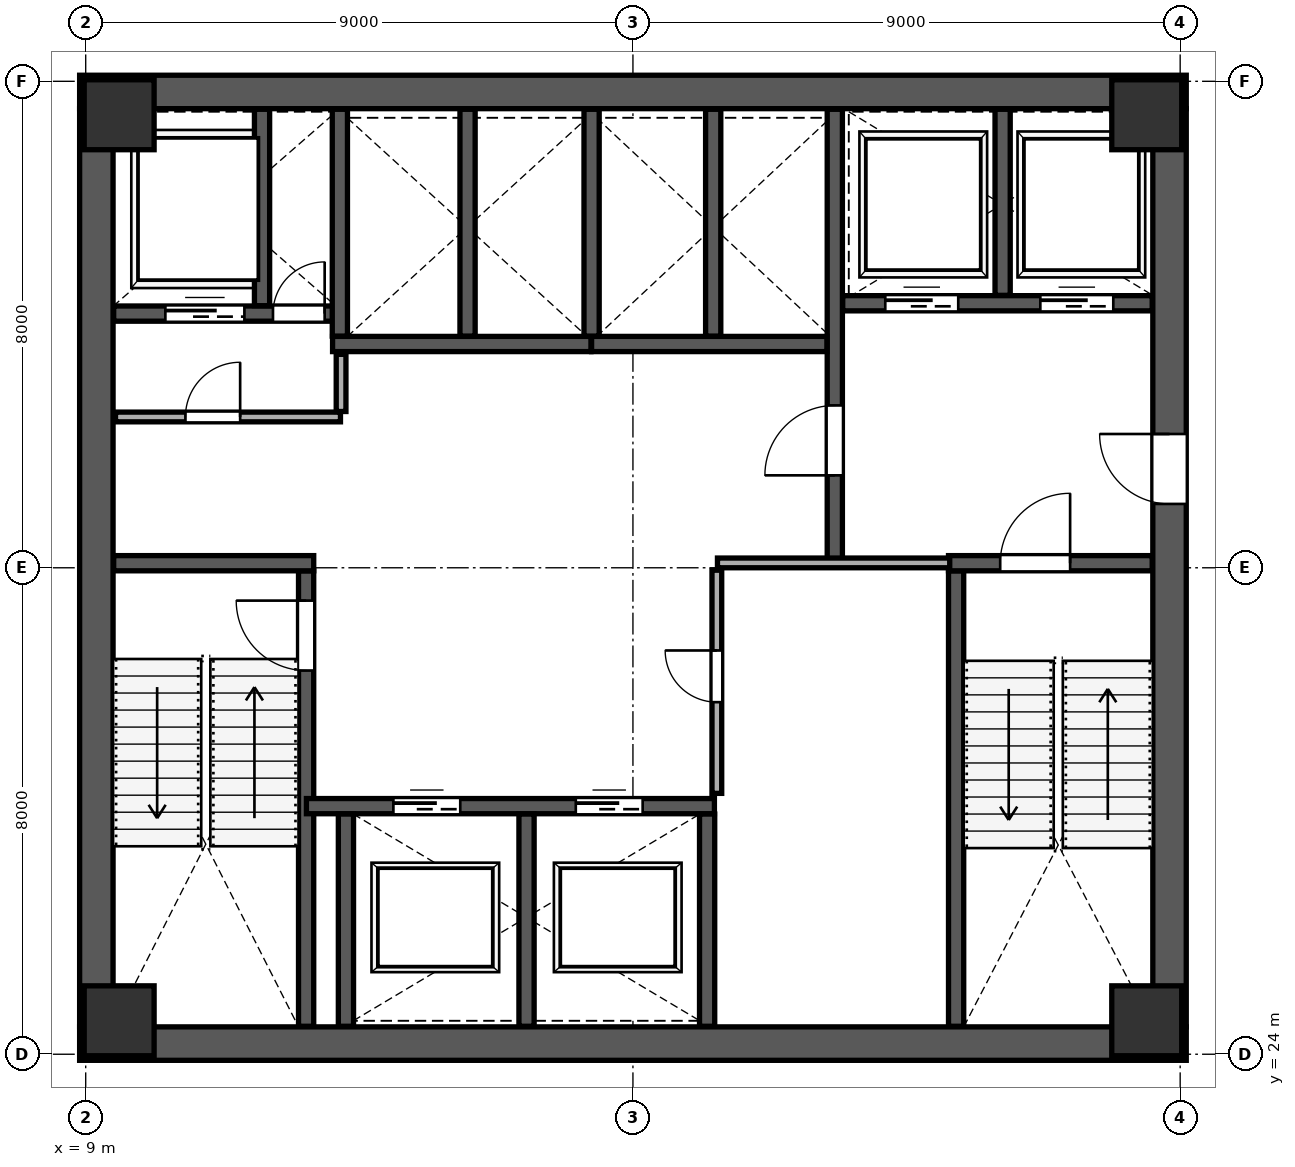
"""IFC4 building model, lengths in metres.
Left out: names, types, materials, properties, quantities, classifications, styles, units other than length and angle.
Written with IfcOpenShell. Run it as: python <this file> out.ifc"""

import sys

from ifc_helpers import new_model, si_unit, direction, frame, frame_2d, origin, origin_2d, place, context, subcontext, project, spatial, rectangle, extrude, source, transform, mapped, element, fill, save


model = new_model("IFC4")
c1 = context("Model", 3, precision=1e-05, world=origin(), true_north=direction((0.0, 1.0)))
c2 = subcontext(c1, "Body", "Model", "MODEL_VIEW")
j1 = project(units=[si_unit("LENGTHUNIT", "METRE"), si_unit("PLANEANGLEUNIT", "RADIAN")], contexts=[c1])
p1 = place(None, origin())
s1 = spatial("IfcSite", under=j1, at=p1, CompositionType="ELEMENT")
p2 = place(p1, origin())
s2 = spatial("IfcBuilding", under=s1, at=p2, CompositionType="ELEMENT")
p3 = place(p2, frame((0.0, 0.0, 112.6)))
s3 = spatial("IfcBuildingStorey", under=s2, at=p3, CompositionType="ELEMENT", Elevation=112.6)
m1 = source(origin(), c2, "Body", "SweptSolid", [
    extrude(rectangle(XDim=1.15, YDim=1.15, at=origin_2d()), origin(), (0.0, 0.0, 1.0), 4.198),
])
for number, where, z_axis, x_axis in (
    (1, (9.55, 24.55, 0.001), (0.0, 0.0, 1.0), (1.0, 0.0, 0.0)),
    (2, (26.45, 24.55, 0.001), (0.0, 0.0, 1.0), (1.0, 0.0, 0.0)),
    (3, (9.55, 39.45, 0.001), (0.0, 0.0, 1.0), (1.0, 0.0, 0.0)),
    (4, (26.45, 39.45, 0.001), (0.0, 0.0, 1.0), (1.0, 0.0, 0.0)),
):
    element("IfcColumn", number, at=place(p3, frame(where, z_axis=z_axis, x_axis=x_axis)), inside=s3, PredefinedType="COLUMN", context=c2, shape_type="MappedRepresentation", body=[
        mapped(m1, transform((0.0, 0.0, 0.0), scale=1.0)),
    ])
p4 = place(p3, frame((9.175, 24.45, 0.0), z_axis=(0.0, 0.0, 1.0), x_axis=(0.0, 1.0, 0.0)))
e5 = element("IfcWall", 5, at=p4, inside=s3, PredefinedType="SHEAR", context=c2, shape_type="SweptSolid", body=[
    extrude(rectangle(XDim=15.1, YDim=0.55, at=frame_2d((7.55, 0.0))), origin(), (0.0, 0.0, 1.0), 3.96),
])
p5 = place(p3, frame((26.825, 24.45, 0.0), z_axis=(0.0, 0.0, 1.0), x_axis=(0.0, 1.0, 0.0)))
e6 = element("IfcWall", 6, at=p5, inside=s3, PredefinedType="SHEAR", context=c2, shape_type="SweptSolid", body=[
    extrude(rectangle(XDim=15.1, YDim=0.55, at=frame_2d((7.55, 0.0))), origin(), (0.0, 0.0, 1.0), 3.96),
])
p6 = place(p5, frame((8.6, 0.0, 0.0)))
e7 = element("IfcOpeningElement", 7, at=p6, cuts=e6, PredefinedType="OPENING", context=c2, shape_type="SweptSolid", body=[
    extrude(rectangle(XDim=1.15, YDim=2.2, at=frame_2d((0.575, 1.1))), frame((0.0, 0.285, 0.0), z_axis=(0.0, -1.0, 0.0), x_axis=(1.0, 0.0, 0.0)), (0.0, 0.0, 1.0), 0.57),
])
for number, where, z_axis, x_axis in (
    (8, (8.9, 24.175, 0.0), (0.0, 0.0, 1.0), (1.0, 0.0, 0.0)),
    (9, (8.9, 39.825, 0.0), (0.0, 0.0, 1.0), (1.0, 0.0, 0.0)),
):
    element("IfcWall", number, at=place(p3, frame(where, z_axis=z_axis, x_axis=x_axis)), inside=s3, PredefinedType="SHEAR", context=c2, shape_type="SweptSolid", body=[
        extrude(rectangle(XDim=18.2, YDim=0.55, at=frame_2d((9.1, 0.0))), origin(), (0.0, 0.0, 1.0), 3.96),
    ])
p7 = place(p3, frame((12.625, 24.46, 0.0), z_axis=(0.0, 0.0, 1.0), x_axis=(0.0, 1.0, 0.0)))
e10 = element("IfcWall", 10, at=p7, inside=s3, PredefinedType="SHEAR", context=c2, shape_type="SweptSolid", body=[
    extrude(rectangle(XDim=7.49, YDim=0.25, at=frame_2d((3.745, 0.0))), origin(), (0.0, 0.0, 1.0), 3.96),
])
p8 = place(p7, frame((5.85, 0.0, 0.0)))
e11 = element("IfcOpeningElement", 11, at=p8, cuts=e10, PredefinedType="OPENING", context=c2, shape_type="SweptSolid", body=[
    extrude(rectangle(XDim=1.15, YDim=2.2, at=frame_2d((0.575, 1.1))), frame((0.0, 0.135, 0.0), z_axis=(0.0, -1.0, 0.0), x_axis=(1.0, 0.0, 0.0)), (0.0, 0.0, 1.0), 0.27),
])
p9 = place(p3, frame((9.46, 32.075, 0.0), z_axis=(0.0, 0.0, 1.0), x_axis=(1.0, 0.0, 0.0)))
e12 = element("IfcWall", 12, at=p9, inside=s3, PredefinedType="SHEAR", context=c2, shape_type="SweptSolid", body=[
    extrude(rectangle(XDim=3.29, YDim=0.25, at=frame_2d((1.645, 0.0))), origin(), (0.0, 0.0, 1.0), 3.96),
])
p10 = place(p3, frame((23.315, 24.46, 0.0), z_axis=(0.0, 0.0, 1.0), x_axis=(0.0, 1.0, 0.0)))
e13 = element("IfcWall", 13, at=p10, inside=s3, PredefinedType="SHEAR", context=c2, shape_type="SweptSolid", body=[
    extrude(rectangle(XDim=7.49, YDim=0.25, at=frame_2d((3.745, 0.0))), origin(), (0.0, 0.0, 1.0), 3.96),
])
p11 = place(p3, frame((23.19, 32.075, 0.0), z_axis=(0.0, 0.0, 1.0), x_axis=(1.0, 0.0, 0.0)))
e14 = element("IfcWall", 14, at=p11, inside=s3, PredefinedType="SHEAR", context=c2, shape_type="SweptSolid", body=[
    extrude(rectangle(XDim=3.35, YDim=0.25, at=frame_2d((1.675, 0.0))), origin(), (0.0, 0.0, 1.0), 3.96),
])
p12 = place(p11, frame((0.85, 0.0, 0.0)))
e15 = element("IfcOpeningElement", 15, at=p12, cuts=e14, PredefinedType="OPENING", context=c2, shape_type="SweptSolid", body=[
    extrude(rectangle(XDim=1.15, YDim=2.2, at=frame_2d((0.575, 1.1))), frame((0.0, 0.135, 0.0), z_axis=(0.0, -1.0, 0.0), x_axis=(1.0, 0.0, 0.0)), (0.0, 0.0, 1.0), 0.27),
])
p13 = place(p3, frame((21.32, 32.12, 0.0), z_axis=(0.0, 0.0, 1.0), x_axis=(0.0, 1.0, 0.0)))
e16 = element("IfcWall", 16, at=p13, inside=s3, PredefinedType="SHEAR", context=c2, shape_type="SweptSolid", body=[
    extrude(rectangle(XDim=7.42, YDim=0.25, at=frame_2d((3.71, 0.0))), origin(), (0.0, 0.0, 1.0), 3.96),
])
p14 = place(p13, frame((1.4, 0.0, 0.0)))
e17 = element("IfcOpeningElement", 17, at=p14, cuts=e16, PredefinedType="OPENING", context=c2, shape_type="SweptSolid", body=[
    extrude(rectangle(XDim=1.15, YDim=2.2, at=frame_2d((0.575, 1.1))), frame((0.0, 0.135, 0.0), z_axis=(0.0, -1.0, 0.0), x_axis=(1.0, 0.0, 0.0)), (0.0, 0.0, 1.0), 0.27),
])
p15 = place(p3, frame((9.46, 36.18, 0.0), z_axis=(0.0, 0.0, 1.0), x_axis=(1.0, 0.0, 0.0)))
e18 = element("IfcWall", 18, at=p15, inside=s3, PredefinedType="SHEAR", context=c2, shape_type="SweptSolid", body=[
    extrude(rectangle(XDim=3.79, YDim=0.25, at=frame_2d((1.895, 0.0))), origin(), (0.0, 0.0, 1.0), 3.96),
])
p16 = place(p15, frame((2.62, 0.0, 0.0)))
e19 = element("IfcOpeningElement", 19, at=p16, cuts=e18, PredefinedType="OPENING", context=c2, shape_type="SweptSolid", body=[
    extrude(rectangle(XDim=0.85, YDim=2.1, at=frame_2d((0.425, 1.05))), frame((0.0, 0.135, 0.0), z_axis=(0.0, -1.0, 0.0), x_axis=(1.0, 0.0, 0.0)), (0.0, 0.0, 1.0), 0.27),
])
p17 = place(p15, frame((0.85, 0.0, 0.0)))
e20 = element("IfcOpeningElement", 20, at=p17, cuts=e18, PredefinedType="OPENING", context=c2, shape_type="SweptSolid", body=[
    extrude(rectangle(XDim=1.3, YDim=2.25, at=frame_2d((0.65, 1.125))), frame((0.0, 0.135, 0.0), z_axis=(0.0, -1.0, 0.0), x_axis=(1.0, 0.0, 0.0)), (0.0, 0.0, 1.0), 0.27),
])
p18 = place(p3, frame((11.9, 36.31, 0.0), z_axis=(0.0, 0.0, 1.0), x_axis=(0.0, 1.0, 0.0)))
e21 = element("IfcWall", 21, at=p18, inside=s3, PredefinedType="SHEAR", context=c2, shape_type="SweptSolid", body=[
    extrude(rectangle(XDim=3.23, YDim=0.25, at=frame_2d((1.615, 0.0))), origin(), (0.0, 0.0, 1.0), 3.96),
])
p19 = place(p3, frame((21.45, 36.35, 0.0), z_axis=(0.0, 0.0, 1.0), x_axis=(1.0, 0.0, 0.0)))
e22 = element("IfcWall", 22, at=p19, inside=s3, PredefinedType="SHEAR", context=c2, shape_type="SweptSolid", body=[
    extrude(rectangle(XDim=5.09, YDim=0.25, at=frame_2d((2.545, 0.0))), origin(), (0.0, 0.0, 1.0), 3.96),
])
p20 = place(p19, frame((0.7, 0.0, 0.0)))
e23 = element("IfcOpeningElement", 23, at=p20, cuts=e22, PredefinedType="OPENING", context=c2, shape_type="SweptSolid", body=[
    extrude(rectangle(XDim=1.2, YDim=2.2, at=frame_2d((0.6, 1.1))), frame((0.0, 0.135, 0.0), z_axis=(0.0, -1.0, 0.0), x_axis=(1.0, 0.0, 0.0)), (0.0, 0.0, 1.0), 0.27),
])
p21 = place(p19, frame((3.25, 0.0, 0.0)))
e24 = element("IfcOpeningElement", 24, at=p21, cuts=e22, PredefinedType="OPENING", context=c2, shape_type="SweptSolid", body=[
    extrude(rectangle(XDim=1.2, YDim=2.2, at=frame_2d((0.6, 1.1))), frame((0.0, 0.135, 0.0), z_axis=(0.0, -1.0, 0.0), x_axis=(1.0, 0.0, 0.0)), (0.0, 0.0, 1.0), 0.27),
])
p22 = place(p3, frame((24.08, 36.48, 0.0), z_axis=(0.0, 0.0, 1.0), x_axis=(0.0, 1.0, 0.0)))
e25 = element("IfcWall", 25, at=p22, inside=s3, PredefinedType="SHEAR", context=c2, shape_type="SweptSolid", body=[
    extrude(rectangle(XDim=3.06, YDim=0.25, at=frame_2d((1.53, 0.0))), origin(), (0.0, 0.0, 1.0), 3.96),
])
p23 = place(p3, frame((12.63, 28.08, 0.0), z_axis=(0.0, 0.0, 1.0), x_axis=(1.0, 0.0, 0.0)))
e26 = element("IfcWall", 26, at=p23, inside=s3, PredefinedType="SHEAR", context=c2, shape_type="SweptSolid", body=[
    extrude(rectangle(XDim=6.71, YDim=0.25, at=frame_2d((3.355, 0.0))), origin(), (0.0, 0.0, 1.0), 3.96),
])
p24 = place(p23, frame((1.43, 0.0, 0.0)))
e27 = element("IfcOpeningElement", 27, at=p24, cuts=e26, PredefinedType="OPENING", context=c2, shape_type="SweptSolid", body=[
    extrude(rectangle(XDim=1.1, YDim=2.2, at=frame_2d((0.55, 1.1))), frame((0.0, 0.135, 0.0), z_axis=(0.0, -1.0, 0.0), x_axis=(1.0, 0.0, 0.0)), (0.0, 0.0, 1.0), 0.27),
])
p25 = place(p23, frame((4.43, 0.0, 0.0)))
e28 = element("IfcOpeningElement", 28, at=p25, cuts=e26, PredefinedType="OPENING", context=c2, shape_type="SweptSolid", body=[
    extrude(rectangle(XDim=1.1, YDim=2.2, at=frame_2d((0.55, 1.1))), frame((0.0, 0.135, 0.0), z_axis=(0.0, -1.0, 0.0), x_axis=(1.0, 0.0, 0.0)), (0.0, 0.0, 1.0), 0.27),
])
for number, where, z_axis, x_axis in (
    (29, (13.28, 24.46, 0.0), (0.0, 0.0, 1.0), (0.0, 1.0, 0.0)),
    (30, (16.25, 24.46, 0.0), (0.0, 0.0, 1.0), (0.0, 1.0, 0.0)),
    (31, (19.22, 24.46, 0.0), (0.0, 0.0, 1.0), (0.0, 1.0, 0.0)),
):
    element("IfcWall", number, at=place(p3, frame(where, z_axis=z_axis, x_axis=x_axis)), inside=s3, PredefinedType="SHEAR", context=c2, shape_type="SweptSolid", body=[
        extrude(rectangle(XDim=3.49, YDim=0.25, at=frame_2d((1.745, 0.0))), origin(), (0.0, 0.0, 1.0), 3.96),
    ])
p26 = place(p3, frame((13.06, 35.68, 0.0), z_axis=(0.0, 0.0, 1.0), x_axis=(1.0, 0.0, 0.0)))
e32 = element("IfcWall", 32, at=p26, inside=s3, PredefinedType="SHEAR", context=c2, shape_type="SweptSolid", body=[
    extrude(rectangle(XDim=4.25, YDim=0.25, at=frame_2d((2.125, 0.0))), origin(), (0.0, 0.0, 1.0), 3.96),
])
for number, where, z_axis, x_axis in (
    (33, (13.18, 35.81, 0.0), (0.0, 0.0, 1.0), (0.0, 1.0, 0.0)),
    (34, (15.28, 35.81, 0.0), (0.0, 0.0, 1.0), (0.0, 1.0, 0.0)),
):
    element("IfcWall", number, at=place(p3, frame(where, z_axis=z_axis, x_axis=x_axis)), inside=s3, PredefinedType="SHEAR", context=c2, shape_type="SweptSolid", body=[
        extrude(rectangle(XDim=3.73, YDim=0.25, at=frame_2d((1.865, 0.0))), origin(), (0.0, 0.0, 1.0), 3.96),
    ])
p27 = place(p3, frame((17.32, 35.68, 0.0), z_axis=(0.0, 0.0, 1.0), x_axis=(1.0, 0.0, 0.0)))
e35 = element("IfcWall", 35, at=p27, inside=s3, PredefinedType="SHEAR", context=c2, shape_type="SweptSolid", body=[
    extrude(rectangle(XDim=3.87, YDim=0.25, at=frame_2d((1.935, 0.0))), origin(), (0.0, 0.0, 1.0), 3.96),
])
for number, where, z_axis, x_axis in (
    (36, (17.32, 35.81, 0.0), (0.0, 0.0, 1.0), (0.0, 1.0, 0.0)),
    (37, (19.32, 35.81, 0.0), (0.0, 0.0, 1.0), (0.0, 1.0, 0.0)),
):
    element("IfcWall", number, at=place(p3, frame(where, z_axis=z_axis, x_axis=x_axis)), inside=s3, PredefinedType="SHEAR", context=c2, shape_type="SweptSolid", body=[
        extrude(rectangle(XDim=3.73, YDim=0.25, at=frame_2d((1.865, 0.0))), origin(), (0.0, 0.0, 1.0), 3.96),
    ])
p28 = place(p3, frame((9.49, 34.48, 0.0), z_axis=(0.0, 0.0, 1.0), x_axis=(1.0, 0.0, 0.0)))
e38 = element("IfcWall", 38, at=p28, inside=s3, PredefinedType="PARTITIONING", context=c2, shape_type="SweptSolid", body=[
    extrude(rectangle(XDim=3.7, YDim=0.16, at=frame_2d((1.85, 0.0))), origin(), (0.0, 0.0, 1.0), 3.96),
])
p29 = place(p28, frame((1.15, 0.0, 0.0)))
e39 = element("IfcOpeningElement", 39, at=p29, cuts=e38, PredefinedType="OPENING", context=c2, shape_type="SweptSolid", body=[
    extrude(rectangle(XDim=0.9, YDim=2.15, at=frame_2d((0.45, 1.075))), frame((0.0, 0.09, 0.0), z_axis=(0.0, -1.0, 0.0), x_axis=(1.0, 0.0, 0.0)), (0.0, 0.0, 1.0), 0.18),
])
p30 = place(p3, frame((13.2, 34.57, 0.0), z_axis=(0.0, 0.0, 1.0), x_axis=(0.0, 1.0, 0.0)))
e40 = element("IfcWall", 40, at=p30, inside=s3, PredefinedType="PARTITIONING", context=c2, shape_type="SweptSolid", body=[
    extrude(rectangle(XDim=0.94, YDim=0.16, at=frame_2d((0.47, 0.0))), origin(), (0.0, 0.0, 1.0), 3.96),
])
p31 = place(p3, frame((19.39, 32.08, 0.0), z_axis=(0.0, 0.0, 1.0), x_axis=(1.0, 0.0, 0.0)))
e41 = element("IfcWall", 41, at=p31, inside=s3, PredefinedType="PARTITIONING", context=c2, shape_type="SweptSolid", body=[
    extrude(rectangle(XDim=3.82, YDim=0.16, at=frame_2d((1.91, 0.0))), origin(), (0.0, 0.0, 1.0), 3.96),
])
p32 = place(p3, frame((19.38, 28.29, 0.0), z_axis=(0.0, 0.0, 1.0), x_axis=(0.0, 1.0, 0.0)))
e42 = element("IfcWall", 42, at=p32, inside=s3, PredefinedType="PARTITIONING", context=c2, shape_type="SweptSolid", body=[
    extrude(rectangle(XDim=3.67, YDim=0.16, at=frame_2d((1.835, 0.0))), origin(), (0.0, 0.0, 1.0), 3.96),
])
p33 = place(p32, frame((1.5, 0.0, 0.0)))
e43 = element("IfcOpeningElement", 43, at=p33, cuts=e42, PredefinedType="OPENING", context=c2, shape_type="SweptSolid", body=[
    extrude(rectangle(XDim=0.85, YDim=2.1, at=frame_2d((0.425, 1.05))), frame((0.0, 0.09, 0.0), z_axis=(0.0, -1.0, 0.0), x_axis=(1.0, 0.0, 0.0)), (0.0, 0.0, 1.0), 0.18),
])
p34 = place(p3, frame((8.053, 47.616, 0.0), z_axis=(0.0, 0.0, 1.0), x_axis=(0.953717706363, -0.300703402989, 0.0)))
e44 = element("IfcWall", 44, at=p34, inside=s3, PredefinedType="PARTITIONING", context=c2, shape_type="SweptSolid", body=[
    extrude(rectangle(XDim=27.14, YDim=0.1, at=frame_2d((13.57, 0.0))), origin(), (0.0, 0.0, 1.0), 3.96),
])
p35 = place(p34, frame((0.91, 0.0, 0.0)))
e45 = element("IfcOpeningElement", 45, at=p35, cuts=e44, PredefinedType="OPENING", context=c2, shape_type="SweptSolid", body=[
    extrude(rectangle(XDim=0.95, YDim=2.15, at=frame_2d((0.475, 1.075))), frame((0.0, 0.06, 0.0), z_axis=(0.0, -1.0, 0.0), x_axis=(1.0, 0.0, 0.0)), (0.0, 0.0, 1.0), 0.12),
])
p36 = place(p3, frame((25.294, 11.909, 0.0), z_axis=(0.0, 0.0, 1.0), x_axis=(0.300707324156, 0.953716470026, 0.0)))
e46 = element("IfcWall", 46, at=p36, inside=s3, PredefinedType="PARTITIONING", context=c2, shape_type="SweptSolid", body=[
    extrude(rectangle(XDim=12.18, YDim=0.16, at=frame_2d((6.09, 0.0))), origin(), (0.0, 0.0, 1.0), 3.96),
])
m2 = source(origin(), c2, "Body", "SweptSolid", [
    extrude(rectangle(XDim=1.15, YDim=2.2, at=frame_2d((0.575, 1.1))), frame((0.0, 0.025, 0.0), z_axis=(0.0, -1.0, 0.0), x_axis=(1.0, 0.0, 0.0)), (0.0, 0.0, 1.0), 0.05),
])
p37 = place(p8, origin())
e47 = element("IfcDoor", 47, at=p37, inside=s3, OperationType="SINGLE_SWING_RIGHT", PredefinedType="DOOR", context=c2, shape_type="MappedRepresentation", body=[
    mapped(m2, transform((0.0, 0.0, 0.0), scale=1.0)),
])
fill(e11, e47)
m3 = source(origin(), c2, "Body", "SweptSolid", [
    extrude(rectangle(XDim=1.15, YDim=2.2, at=frame_2d((0.575, 1.1))), frame((0.0, 0.025, 0.0), z_axis=(0.0, -1.0, 0.0), x_axis=(1.0, 0.0, 0.0)), (0.0, 0.0, 1.0), 0.05),
])
p38 = place(p14, origin())
e48 = element("IfcDoor", 48, at=p38, inside=s3, OperationType="SINGLE_SWING_LEFT", PredefinedType="DOOR", context=c2, shape_type="MappedRepresentation", body=[
    mapped(m3, transform((0.0, 0.0, 0.0), scale=1.0)),
])
fill(e17, e48)
p39 = place(p12, origin())
e49 = element("IfcDoor", 49, at=p39, inside=s3, OperationType="SINGLE_SWING_RIGHT", PredefinedType="DOOR", context=c2, shape_type="MappedRepresentation", body=[
    mapped(m2, transform((0.0, 0.0, 0.0), scale=1.0)),
])
fill(e15, e49)
p40 = place(p6, origin())
e50 = element("IfcDoor", 50, at=p40, inside=s3, OperationType="SINGLE_SWING_RIGHT", PredefinedType="DOOR", context=c2, shape_type="MappedRepresentation", body=[
    mapped(m3, transform((0.0, 0.0, 0.0), scale=1.0)),
])
fill(e7, e50)
m4 = source(origin(), c2, "Body", "SweptSolid", [
    extrude(rectangle(XDim=0.85, YDim=2.1, at=frame_2d((0.425, 1.05))), frame((0.0, 0.025, 0.0), z_axis=(0.0, -1.0, 0.0), x_axis=(1.0, 0.0, 0.0)), (0.0, 0.0, 1.0), 0.05),
])
p41 = place(p16, origin())
e51 = element("IfcDoor", 51, at=p41, inside=s3, OperationType="SINGLE_SWING_RIGHT", PredefinedType="DOOR", context=c2, shape_type="MappedRepresentation", body=[
    mapped(m4, transform((0.0, 0.0, 0.0), scale=1.0)),
])
fill(e19, e51)
m5 = source(origin(), c2, "Body", "SweptSolid", [
    extrude(rectangle(XDim=1.1, YDim=2.2, at=frame_2d((0.55, 1.1))), frame((0.0, 0.025, 0.0), z_axis=(0.0, -1.0, 0.0), x_axis=(1.0, 0.0, 0.0)), (0.0, 0.0, 1.0), 0.05),
])
p42 = place(p24, origin())
e52 = element("IfcDoor", 52, at=p42, inside=s3, OperationType="SLIDING_TO_LEFT", PredefinedType="DOOR", context=c2, shape_type="MappedRepresentation", body=[
    mapped(m5, transform((0.0, 0.0, 0.0), scale=1.0)),
])
fill(e27, e52)
p43 = place(p25, origin())
e53 = element("IfcDoor", 53, at=p43, inside=s3, OperationType="SLIDING_TO_RIGHT", PredefinedType="DOOR", context=c2, shape_type="MappedRepresentation", body=[
    mapped(m5, transform((0.0, 0.0, 0.0), scale=1.0)),
])
fill(e28, e53)
m6 = source(origin(), c2, "Body", "SweptSolid", [
    extrude(rectangle(XDim=1.2, YDim=2.2, at=frame_2d((0.6, 1.1))), frame((0.0, 0.025, 0.0), z_axis=(0.0, -1.0, 0.0), x_axis=(1.0, 0.0, 0.0)), (0.0, 0.0, 1.0), 0.05),
])
p44 = place(p20, origin())
e54 = element("IfcDoor", 54, at=p44, inside=s3, OperationType="SLIDING_TO_LEFT", PredefinedType="DOOR", context=c2, shape_type="MappedRepresentation", body=[
    mapped(m6, transform((0.0, 0.0, 0.0), scale=1.0)),
])
fill(e23, e54)
p45 = place(p21, origin())
e55 = element("IfcDoor", 55, at=p45, inside=s3, OperationType="SLIDING_TO_RIGHT", PredefinedType="DOOR", context=c2, shape_type="MappedRepresentation", body=[
    mapped(m6, transform((0.0, 0.0, 0.0), scale=1.0)),
])
fill(e24, e55)
m7 = source(origin(), c2, "Body", "SweptSolid", [
    extrude(rectangle(XDim=1.3, YDim=2.25, at=frame_2d((0.65, 1.125))), frame((0.0, 0.025, 0.0), z_axis=(0.0, -1.0, 0.0), x_axis=(1.0, 0.0, 0.0)), (0.0, 0.0, 1.0), 0.05),
])
p46 = place(p17, origin())
e56 = element("IfcDoor", 56, at=p46, inside=s3, OperationType="SLIDING_TO_LEFT", PredefinedType="DOOR", context=c2, shape_type="MappedRepresentation", body=[
    mapped(m7, transform((0.0, 0.0, 0.0), scale=1.0)),
])
fill(e20, e56)
m8 = source(origin(), c2, "Body", "SweptSolid", [
    extrude(rectangle(XDim=0.9, YDim=2.15, at=frame_2d((0.45, 1.075))), frame((0.0, 0.025, 0.0), z_axis=(0.0, -1.0, 0.0), x_axis=(1.0, 0.0, 0.0)), (0.0, 0.0, 1.0), 0.05),
])
p47 = place(p29, origin())
e57 = element("IfcDoor", 57, at=p47, inside=s3, OperationType="SINGLE_SWING_RIGHT", PredefinedType="DOOR", context=c2, shape_type="MappedRepresentation", body=[
    mapped(m8, transform((0.0, 0.0, 0.0), scale=1.0)),
])
fill(e39, e57)
p48 = place(p33, origin())
e58 = element("IfcDoor", 58, at=p48, inside=s3, OperationType="SINGLE_SWING_RIGHT", PredefinedType="DOOR", context=c2, shape_type="MappedRepresentation", body=[
    mapped(m4, transform((0.0, 0.0, 0.0), scale=1.0)),
])
fill(e43, e58)
save(model, sys.argv[1])
